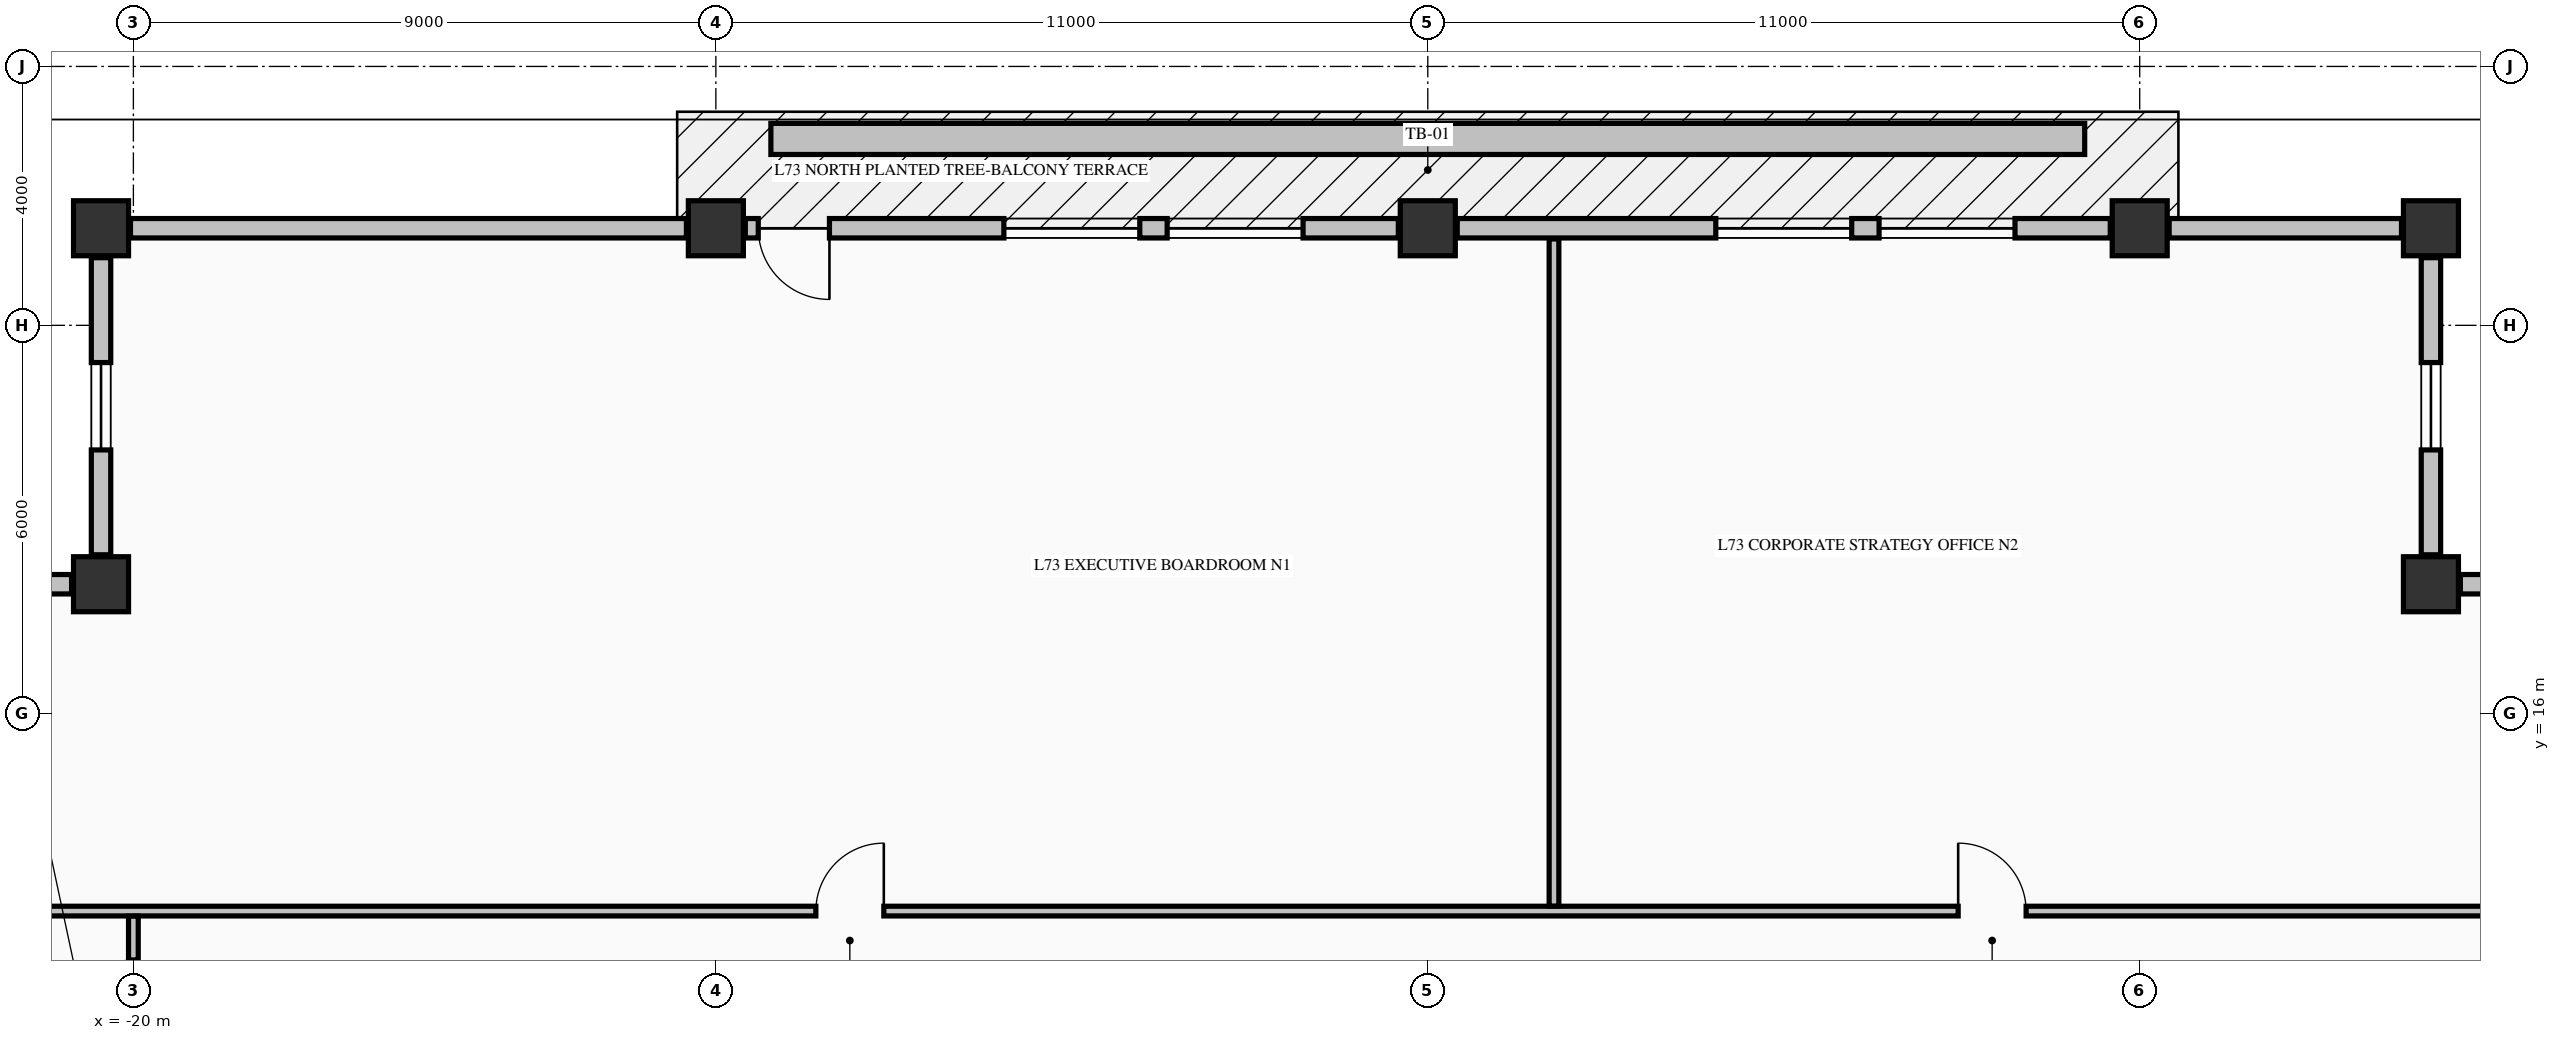
"""IFC4 building model, lengths in metres.
Left out: names, types, materials, properties, quantities, classifications, styles, units other than length and angle.
Written with IfcOpenShell. Run it as: python <this file> out.ifc"""

import sys

from ifc_helpers import new_model, si_unit, direction, frame, frame_2d, origin, origin_2d, place, context, subcontext, project, spatial, rectangle, extrude, element, fill, save


model = new_model("IFC4")
c1 = context("Model", 3, precision=1e-05, world=origin(), true_north=direction((0.0, 1.0)))
c2 = subcontext(c1, "Body", "Model", "MODEL_VIEW")
j1 = project(units=[si_unit("LENGTHUNIT", "METRE"), si_unit("PLANEANGLEUNIT", "RADIAN")], contexts=[c1])
p1 = place(None, origin())
s1 = spatial("IfcSite", under=j1, at=p1, CompositionType="ELEMENT")
p2 = place(p1, origin())
s2 = spatial("IfcBuilding", under=s1, at=p2, CompositionType="ELEMENT")
p3 = place(p2, frame((0.0, 0.0, 274.32)))
s3 = spatial("IfcBuildingStorey", under=s2, at=p3, CompositionType="ELEMENT", Elevation=274.32)
for number, where, z_axis, x_axis in (
    (1, (-20.5, 23.5, -0.25), (0.0, 0.0, 1.0), (1.0, 0.0, 0.0)),
    (2, (-11.0, 23.5, -0.25), (0.0, 0.0, 1.0), (1.0, 0.0, 0.0)),
    (3, (0.0, 23.5, -0.25), (0.0, 0.0, 1.0), (1.0, 0.0, 0.0)),
    (4, (11.0, 23.5, -0.25), (0.0, 0.0, 1.0), (1.0, 0.0, 0.0)),
    (5, (15.5, 23.5, -0.25), (0.0, 0.0, 1.0), (1.0, 0.0, 0.0)),
    (6, (15.5, 18.0, -0.25), (0.0, 0.0, 1.0), (1.0, 0.0, 0.0)),
    (7, (-20.5, 18.0, -0.25), (0.0, 0.0, 1.0), (1.0, 0.0, 0.0)),
):
    element("IfcColumn", number, at=place(p3, frame(where, z_axis=z_axis, x_axis=x_axis)), inside=s3, PredefinedType="COLUMN", context=c2, shape_type="SweptSolid", body=[
        extrude(rectangle(XDim=0.85, YDim=0.85, at=origin_2d()), origin(), (0.0, 0.0, 1.0), 3.565),
    ])
p4 = place(p3, frame((20.545, 18.0, 0.0), z_axis=(0.0, 0.0, 1.0), x_axis=(-1.0, 0.0, 0.0)))
e8 = element("IfcWall", 8, at=p4, inside=s3, PredefinedType="STANDARD", context=c2, shape_type="SweptSolid", body=[
    extrude(rectangle(XDim=4.59, YDim=0.3, at=frame_2d((2.295, 0.0))), origin(), (0.0, 0.0, 1.0), 2.707),
])
p5 = place(p4, frame((1.62, 0.0, 0.68)))
e9 = element("IfcOpeningElement", 9, at=p5, cuts=e8, PredefinedType="OPENING", context=c2, shape_type="SweptSolid", body=[
    extrude(rectangle(XDim=1.35, YDim=1.42, at=frame_2d((0.675, 0.71))), frame((0.0, 0.16, 0.0), z_axis=(0.0, -1.0, 0.0), x_axis=(1.0, 0.0, 0.0)), (0.0, 0.0, 1.0), 0.32),
])
p6 = place(p3, frame((15.5, 18.455, 0.0), z_axis=(0.0, 0.0, 1.0), x_axis=(0.0, 1.0, 0.0)))
e10 = element("IfcWall", 10, at=p6, inside=s3, PredefinedType="STANDARD", context=c2, shape_type="SweptSolid", body=[
    extrude(rectangle(XDim=4.59, YDim=0.3, at=frame_2d((2.295, 0.0))), origin(), (0.0, 0.0, 1.0), 2.707),
])
p7 = place(p6, frame((1.62, 0.0, 0.68)))
e11 = element("IfcOpeningElement", 11, at=p7, cuts=e10, PredefinedType="OPENING", context=c2, shape_type="SweptSolid", body=[
    extrude(rectangle(XDim=1.35, YDim=1.42, at=frame_2d((0.675, 0.71))), frame((0.0, 0.16, 0.0), z_axis=(0.0, -1.0, 0.0), x_axis=(1.0, 0.0, 0.0)), (0.0, 0.0, 1.0), 0.32),
])
p8 = place(p3, frame((-20.5, 23.045, 0.0), z_axis=(0.0, 0.0, 1.0), x_axis=(0.0, -1.0, 0.0)))
e12 = element("IfcWall", 12, at=p8, inside=s3, PredefinedType="STANDARD", context=c2, shape_type="SweptSolid", body=[
    extrude(rectangle(XDim=4.59, YDim=0.3, at=frame_2d((2.295, 0.0))), origin(), (0.0, 0.0, 1.0), 2.707),
])
p9 = place(p8, frame((1.62, 0.0, 0.68)))
e13 = element("IfcOpeningElement", 13, at=p9, cuts=e12, PredefinedType="OPENING", context=c2, shape_type="SweptSolid", body=[
    extrude(rectangle(XDim=1.35, YDim=1.42, at=frame_2d((0.675, 0.71))), frame((0.0, 0.16, 0.0), z_axis=(0.0, -1.0, 0.0), x_axis=(1.0, 0.0, 0.0)), (0.0, 0.0, 1.0), 0.32),
])
p10 = place(p3, frame((-20.955, 18.0, 0.0), z_axis=(0.0, 0.0, 1.0), x_axis=(-1.0, 0.0, 0.0)))
e14 = element("IfcWall", 14, at=p10, inside=s3, PredefinedType="STANDARD", context=c2, shape_type="SweptSolid", body=[
    extrude(rectangle(XDim=4.59, YDim=0.3, at=frame_2d((2.295, 0.0))), origin(), (0.0, 0.0, 1.0), 2.707),
])
p11 = place(p10, frame((1.62, 0.0, 0.68)))
e15 = element("IfcOpeningElement", 15, at=p11, cuts=e14, PredefinedType="OPENING", context=c2, shape_type="SweptSolid", body=[
    extrude(rectangle(XDim=1.35, YDim=1.42, at=frame_2d((0.675, 0.71))), frame((0.0, 0.16, 0.0), z_axis=(0.0, -1.0, 0.0), x_axis=(1.0, 0.0, 0.0)), (0.0, 0.0, 1.0), 0.32),
])
p12 = place(p3, frame((-11.455, 23.5, 0.0), z_axis=(0.0, 0.0, 1.0), x_axis=(-1.0, 0.0, 0.0)))
e16 = element("IfcWall", 16, at=p12, inside=s3, PredefinedType="STANDARD", context=c2, shape_type="SweptSolid", body=[
    extrude(rectangle(XDim=8.59, YDim=0.3, at=frame_2d((4.295, 0.0))), origin(), (0.0, 0.0, 1.0), 2.707),
])
p13 = place(p3, frame((-0.455, 23.5, 0.0), z_axis=(0.0, 0.0, 1.0), x_axis=(-1.0, 0.0, 0.0)))
e17 = element("IfcWall", 17, at=p13, inside=s3, PredefinedType="STANDARD", context=c2, shape_type="SweptSolid", body=[
    extrude(rectangle(XDim=10.09, YDim=0.3, at=frame_2d((5.045, 0.0))), origin(), (0.0, 0.0, 1.0), 2.707),
])
p14 = place(p13, frame((8.79, 0.0, 0.0)))
e18 = element("IfcOpeningElement", 18, at=p14, cuts=e17, PredefinedType="OPENING", context=c2, shape_type="SweptSolid", body=[
    extrude(rectangle(XDim=1.1, YDim=2.15, at=frame_2d((0.55, 1.075))), frame((0.0, 0.16, 0.0), z_axis=(0.0, -1.0, 0.0), x_axis=(1.0, 0.0, 0.0)), (0.0, 0.0, 1.0), 0.32),
])
p15 = place(p13, frame((1.472, 0.0, 0.7)))
e19 = element("IfcOpeningElement", 19, at=p15, cuts=e17, PredefinedType="OPENING", context=c2, shape_type="SweptSolid", body=[
    extrude(rectangle(XDim=2.1, YDim=1.5, at=frame_2d((1.05, 0.75))), frame((0.0, 0.16, 0.0), z_axis=(0.0, -1.0, 0.0), x_axis=(1.0, 0.0, 0.0)), (0.0, 0.0, 1.0), 0.32),
])
p16 = place(p13, frame((3.995, 0.0, 0.7)))
e20 = element("IfcOpeningElement", 20, at=p16, cuts=e17, PredefinedType="OPENING", context=c2, shape_type="SweptSolid", body=[
    extrude(rectangle(XDim=2.1, YDim=1.5, at=frame_2d((1.05, 0.75))), frame((0.0, 0.16, 0.0), z_axis=(0.0, -1.0, 0.0), x_axis=(1.0, 0.0, 0.0)), (0.0, 0.0, 1.0), 0.32),
])
p17 = place(p3, frame((10.545, 23.5, 0.0), z_axis=(0.0, 0.0, 1.0), x_axis=(-1.0, 0.0, 0.0)))
e21 = element("IfcWall", 21, at=p17, inside=s3, PredefinedType="STANDARD", context=c2, shape_type="SweptSolid", body=[
    extrude(rectangle(XDim=10.09, YDim=0.3, at=frame_2d((5.045, 0.0))), origin(), (0.0, 0.0, 1.0), 2.707),
])
p18 = place(p17, frame((1.472, 0.0, 0.7)))
e22 = element("IfcOpeningElement", 22, at=p18, cuts=e21, PredefinedType="OPENING", context=c2, shape_type="SweptSolid", body=[
    extrude(rectangle(XDim=2.1, YDim=1.5, at=frame_2d((1.05, 0.75))), frame((0.0, 0.16, 0.0), z_axis=(0.0, -1.0, 0.0), x_axis=(1.0, 0.0, 0.0)), (0.0, 0.0, 1.0), 0.32),
])
p19 = place(p17, frame((3.995, 0.0, 0.7)))
e23 = element("IfcOpeningElement", 23, at=p19, cuts=e21, PredefinedType="OPENING", context=c2, shape_type="SweptSolid", body=[
    extrude(rectangle(XDim=2.1, YDim=1.5, at=frame_2d((1.05, 0.75))), frame((0.0, 0.16, 0.0), z_axis=(0.0, -1.0, 0.0), x_axis=(1.0, 0.0, 0.0)), (0.0, 0.0, 1.0), 0.32),
])
p20 = place(p3, frame((15.045, 23.5, 0.0), z_axis=(0.0, 0.0, 1.0), x_axis=(-1.0, 0.0, 0.0)))
e24 = element("IfcWall", 24, at=p20, inside=s3, PredefinedType="STANDARD", context=c2, shape_type="SweptSolid", body=[
    extrude(rectangle(XDim=3.59, YDim=0.3, at=frame_2d((1.795, 0.0))), origin(), (0.0, 0.0, 1.0), 2.707),
])
p21 = place(p3, frame((-25.835, 12.95, 0.0), z_axis=(0.0, 0.0, 1.0), x_axis=(1.0, 0.0, 0.0)))
e25 = element("IfcWall", 25, at=p21, inside=s3, PredefinedType="PARTITIONING", context=c2, shape_type="SweptSolid", body=[
    extrude(rectangle(XDim=45.91, YDim=0.15, at=frame_2d((22.955, 0.0))), origin(), (0.0, 0.0, 1.0), 3.315),
])
p22 = place(p21, frame((16.38, 0.0, 0.0)))
e26 = element("IfcOpeningElement", 26, at=p22, cuts=e25, PredefinedType="OPENING", context=c2, shape_type="SweptSolid", body=[
    extrude(rectangle(XDim=1.05, YDim=2.15, at=frame_2d((0.525, 1.075))), frame((0.0, 0.085, 0.0), z_axis=(0.0, -1.0, 0.0), x_axis=(1.0, 0.0, 0.0)), (0.0, 0.0, 1.0), 0.17),
])
p23 = place(p21, frame((34.03, 0.0, 0.0)))
e27 = element("IfcOpeningElement", 27, at=p23, cuts=e25, PredefinedType="OPENING", context=c2, shape_type="SweptSolid", body=[
    extrude(rectangle(XDim=1.05, YDim=2.15, at=frame_2d((0.525, 1.075))), frame((0.0, 0.085, 0.0), z_axis=(0.0, -1.0, 0.0), x_axis=(1.0, 0.0, 0.0)), (0.0, 0.0, 1.0), 0.17),
])
p24 = place(p3, frame((-20.0, 10.856, 0.0), z_axis=(0.0, 0.0, 1.0), x_axis=(0.0, 1.0, 0.0)))
e28 = element("IfcWall", 28, at=p24, inside=s3, PredefinedType="PARTITIONING", context=c2, shape_type="SweptSolid", body=[
    extrude(rectangle(XDim=2.016, YDim=0.15, at=frame_2d((1.008, 0.0))), origin(), (0.0, 0.0, 1.0), 3.315),
])
p25 = place(p24, frame((0.389, 0.0, 0.0)))
e29 = element("IfcOpeningElement", 29, at=p25, cuts=e28, PredefinedType="OPENING", context=c2, shape_type="SweptSolid", body=[
    extrude(rectangle(XDim=0.95, YDim=2.15, at=frame_2d((0.475, 1.075))), frame((0.0, 0.085, 0.0), z_axis=(0.0, -1.0, 0.0), x_axis=(1.0, 0.0, 0.0)), (0.0, 0.0, 1.0), 0.17),
])
p26 = place(p3, frame((1.95, 13.028, 0.0), z_axis=(0.0, 0.0, 1.0), x_axis=(0.0, 1.0, 0.0)))
e30 = element("IfcWall", 30, at=p26, inside=s3, PredefinedType="PARTITIONING", context=c2, shape_type="SweptSolid", body=[
    extrude(rectangle(XDim=10.307, YDim=0.15, at=frame_2d((5.153, 0.0))), origin(), (0.0, 0.0, 1.0), 3.315),
])
p27 = place(p3, frame((-10.15, 24.88, -0.04), z_axis=(0.0, 0.0, 1.0), x_axis=(1.0, 0.0, 0.0)))
e31 = element("IfcWall", 31, at=p27, inside=s3, PredefinedType="PARAPET", context=c2, shape_type="SweptSolid", body=[
    extrude(rectangle(XDim=20.3, YDim=0.48, at=frame_2d((10.15, 0.0))), origin(), (0.0, 0.0, 1.0), 0.52),
])
p28 = place(p7, origin())
e32 = element("IfcWindow", 32, at=p28, inside=s3, PartitioningType="SINGLE_PANEL", PredefinedType="WINDOW", context=c2, shape_type="SweptSolid", body=[
    extrude(rectangle(XDim=1.35, YDim=1.42, at=frame_2d((0.675, 0.71))), frame((0.0, 0.03, 0.0), z_axis=(0.0, -1.0, 0.0), x_axis=(1.0, 0.0, 0.0)), (0.0, 0.0, 1.0), 0.06),
])
fill(e11, e32)
p29 = place(p9, origin())
e33 = element("IfcWindow", 33, at=p29, inside=s3, PartitioningType="SINGLE_PANEL", PredefinedType="WINDOW", context=c2, shape_type="SweptSolid", body=[
    extrude(rectangle(XDim=1.35, YDim=1.42, at=frame_2d((0.675, 0.71))), frame((0.0, 0.03, 0.0), z_axis=(0.0, -1.0, 0.0), x_axis=(1.0, 0.0, 0.0)), (0.0, 0.0, 1.0), 0.06),
])
fill(e13, e33)
p30 = place(p14, origin())
e34 = element("IfcDoor", 34, at=p30, inside=s3, OperationType="SINGLE_SWING_LEFT", PredefinedType="DOOR", context=c2, shape_type="SweptSolid", body=[
    extrude(rectangle(XDim=1.1, YDim=2.15, at=frame_2d((0.55, 1.075))), frame((0.0, 0.025, 0.0), z_axis=(0.0, -1.0, 0.0), x_axis=(1.0, 0.0, 0.0)), (0.0, 0.0, 1.0), 0.05),
])
fill(e18, e34)
p31 = place(p15, origin())
e35 = element("IfcWindow", 35, at=p31, inside=s3, PartitioningType="SINGLE_PANEL", PredefinedType="WINDOW", context=c2, shape_type="SweptSolid", body=[
    extrude(rectangle(XDim=2.1, YDim=1.5, at=frame_2d((1.05, 0.75))), frame((0.0, 0.03, 0.0), z_axis=(0.0, -1.0, 0.0), x_axis=(1.0, 0.0, 0.0)), (0.0, 0.0, 1.0), 0.06),
])
fill(e19, e35)
p32 = place(p16, origin())
e36 = element("IfcWindow", 36, at=p32, inside=s3, PartitioningType="SINGLE_PANEL", PredefinedType="WINDOW", context=c2, shape_type="SweptSolid", body=[
    extrude(rectangle(XDim=2.1, YDim=1.5, at=frame_2d((1.05, 0.75))), frame((0.0, 0.03, 0.0), z_axis=(0.0, -1.0, 0.0), x_axis=(1.0, 0.0, 0.0)), (0.0, 0.0, 1.0), 0.06),
])
fill(e20, e36)
p33 = place(p18, origin())
e37 = element("IfcWindow", 37, at=p33, inside=s3, PartitioningType="SINGLE_PANEL", PredefinedType="WINDOW", context=c2, shape_type="SweptSolid", body=[
    extrude(rectangle(XDim=2.1, YDim=1.5, at=frame_2d((1.05, 0.75))), frame((0.0, 0.03, 0.0), z_axis=(0.0, -1.0, 0.0), x_axis=(1.0, 0.0, 0.0)), (0.0, 0.0, 1.0), 0.06),
])
fill(e22, e37)
p34 = place(p19, origin())
e38 = element("IfcWindow", 38, at=p34, inside=s3, PartitioningType="SINGLE_PANEL", PredefinedType="WINDOW", context=c2, shape_type="SweptSolid", body=[
    extrude(rectangle(XDim=2.1, YDim=1.5, at=frame_2d((1.05, 0.75))), frame((0.0, 0.03, 0.0), z_axis=(0.0, -1.0, 0.0), x_axis=(1.0, 0.0, 0.0)), (0.0, 0.0, 1.0), 0.06),
])
fill(e23, e38)
p35 = place(p22, origin())
e39 = element("IfcDoor", 39, at=p35, inside=s3, OperationType="SINGLE_SWING_RIGHT", PredefinedType="DOOR", context=c2, shape_type="SweptSolid", body=[
    extrude(rectangle(XDim=1.05, YDim=2.15, at=frame_2d((0.525, 1.075))), frame((0.0, 0.025, 0.0), z_axis=(0.0, -1.0, 0.0), x_axis=(1.0, 0.0, 0.0)), (0.0, 0.0, 1.0), 0.05),
])
fill(e26, e39)
p36 = place(p23, origin())
e40 = element("IfcDoor", 40, at=p36, inside=s3, OperationType="SINGLE_SWING_LEFT", PredefinedType="DOOR", context=c2, shape_type="SweptSolid", body=[
    extrude(rectangle(XDim=1.05, YDim=2.15, at=frame_2d((0.525, 1.075))), frame((0.0, 0.025, 0.0), z_axis=(0.0, -1.0, 0.0), x_axis=(1.0, 0.0, 0.0)), (0.0, 0.0, 1.0), 0.05),
])
fill(e27, e40)
p37 = place(p25, origin())
e41 = element("IfcDoor", 41, at=p37, inside=s3, OperationType="SINGLE_SWING_LEFT", PredefinedType="DOOR", context=c2, shape_type="SweptSolid", body=[
    extrude(rectangle(XDim=0.95, YDim=2.15, at=frame_2d((0.475, 1.075))), frame((0.0, 0.025, 0.0), z_axis=(0.0, -1.0, 0.0), x_axis=(1.0, 0.0, 0.0)), (0.0, 0.0, 1.0), 0.05),
])
fill(e29, e41)
save(model, sys.argv[1])
